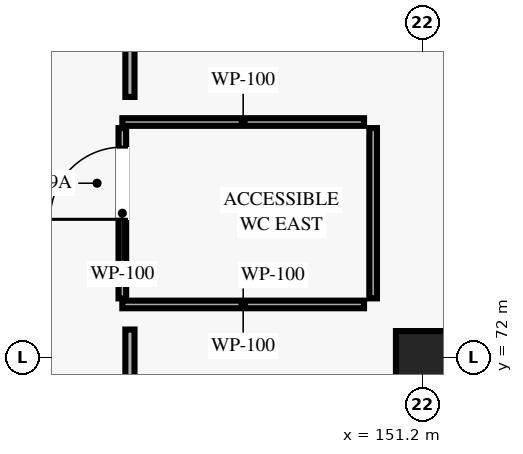
"""IFC4 building model, lengths in metres.
Left out: names, types, materials, properties, quantities, classifications, styles, units other than length and angle.
Written with IfcOpenShell. Run it as: python <this file> out.ifc"""

import sys

from ifc_helpers import new_model, si_unit, direction, frame, frame_2d, origin, origin_2d, place, context, subcontext, project, spatial, rectangle, extrude, element, fill, save


model = new_model("IFC4")
c1 = context("Model", 3, precision=1e-05, world=origin(), true_north=direction((0.0, 1.0)))
c2 = subcontext(c1, "Body", "Model", "MODEL_VIEW")
j1 = project(units=[si_unit("LENGTHUNIT", "METRE"), si_unit("PLANEANGLEUNIT", "RADIAN")], contexts=[c1])
p1 = place(None, origin())
s1 = spatial("IfcSite", under=j1, at=p1, CompositionType="ELEMENT")
p2 = place(p1, origin())
s2 = spatial("IfcBuilding", under=s1, at=p2, CompositionType="ELEMENT")
p3 = place(p2, frame((0.0, 0.0, 13.5)))
s3 = spatial("IfcBuildingStorey", under=s2, at=p3, CompositionType="ELEMENT", Elevation=13.5)
p4 = place(p3, frame((151.2, 72.0, 0.0), z_axis=(0.0, 0.0, 1.0), x_axis=(1.0, 0.0, 0.0)))
e1 = element("IfcColumn", 1, at=p4, inside=s3, PredefinedType="COLUMN", context=c2, shape_type="SweptSolid", body=[
    extrude(rectangle(XDim=0.7, YDim=0.7, at=origin_2d()), origin(), (0.0, 0.0, 1.0), 4.05),
])
p5 = place(p3, frame((147.25, 72.78, 0.0), z_axis=(0.0, 0.0, 1.0), x_axis=(0.0, 1.0, 0.0)))
e2 = element("IfcWall", 2, at=p5, inside=s3, PredefinedType="PARTITIONING", context=c2, shape_type="SweptSolid", body=[
    extrude(rectangle(XDim=2.24, YDim=0.1, at=frame_2d((1.12, 0.0))), origin(), (0.0, 0.0, 1.0), 3.81),
])
p6 = place(p5, frame((1.04, 0.0, 0.0)))
e3 = element("IfcOpeningElement", 3, at=p6, cuts=e2, PredefinedType="OPENING", context=c2, shape_type="SweptSolid", body=[
    extrude(rectangle(XDim=0.95, YDim=2.1, at=frame_2d((0.475, 1.05))), frame((0.0, 0.06, 0.0), z_axis=(0.0, -1.0, 0.0), x_axis=(1.0, 0.0, 0.0)), (0.0, 0.0, 1.0), 0.12),
])
for number, where, z_axis, x_axis in (
    (4, (147.25, 72.7, 0.0), (0.0, 0.0, 1.0), (1.0, 0.0, 0.0)),
    (5, (147.25, 75.1, 0.0), (0.0, 0.0, 1.0), (1.0, 0.0, 0.0)),
):
    element("IfcWall", number, at=place(p3, frame(where, z_axis=z_axis, x_axis=x_axis)), inside=s3, PredefinedType="PARTITIONING", context=c2, shape_type="SweptSolid", body=[
        extrude(rectangle(XDim=3.18, YDim=0.1, at=frame_2d((1.59, 0.0))), origin(), (0.0, 0.0, 1.0), 3.81),
    ])
p7 = place(p3, frame((150.55, 72.78, 0.0), z_axis=(0.0, 0.0, 1.0), x_axis=(0.0, 1.0, 0.0)))
e6 = element("IfcWall", 6, at=p7, inside=s3, PredefinedType="PARTITIONING", context=c2, shape_type="SweptSolid", body=[
    extrude(rectangle(XDim=2.24, YDim=0.1, at=frame_2d((1.12, 0.0))), origin(), (0.0, 0.0, 1.0), 3.81),
])
p8 = place(p3, frame((147.35, 57.15, 0.0), z_axis=(0.0, 0.0, 1.0), x_axis=(0.0, 1.0, 0.0)))
e7 = element("IfcWall", 7, at=p8, inside=s3, PredefinedType="PARTITIONING", context=c2, shape_type="SweptSolid", body=[
    extrude(rectangle(XDim=15.22, YDim=0.12, at=frame_2d((7.61, 0.0))), origin(), (0.0, 0.0, 1.0), 3.81),
])
p9 = place(p8, frame((3.255, 0.0, 0.0)))
e8 = element("IfcOpeningElement", 8, at=p9, cuts=e7, PredefinedType="OPENING", context=c2, shape_type="SweptSolid", body=[
    extrude(rectangle(XDim=1.7, YDim=2.2, at=frame_2d((0.85, 1.1))), frame((0.0, 0.07, 0.0), z_axis=(0.0, -1.0, 0.0), x_axis=(1.0, 0.0, 0.0)), (0.0, 0.0, 1.0), 0.14),
])
p10 = place(p3, frame((147.35, 75.43, 0.0), z_axis=(0.0, 0.0, 1.0), x_axis=(0.0, 1.0, 0.0)))
e9 = element("IfcWall", 9, at=p10, inside=s3, PredefinedType="PARTITIONING", context=c2, shape_type="SweptSolid", body=[
    extrude(rectangle(XDim=13.07, YDim=0.12, at=frame_2d((6.535, 0.0))), origin(), (0.0, 0.0, 1.0), 3.81),
])
p11 = place(p6, origin())
e10 = element("IfcDoor", 10, at=p11, inside=s3, OperationType="SINGLE_SWING_LEFT", PredefinedType="DOOR", context=c2, shape_type="SweptSolid", body=[
    extrude(rectangle(XDim=0.95, YDim=2.1, at=frame_2d((0.475, 1.05))), frame((0.0, 0.025, 0.0), z_axis=(0.0, -1.0, 0.0), x_axis=(1.0, 0.0, 0.0)), (0.0, 0.0, 1.0), 0.05),
])
fill(e3, e10)
save(model, sys.argv[1])
